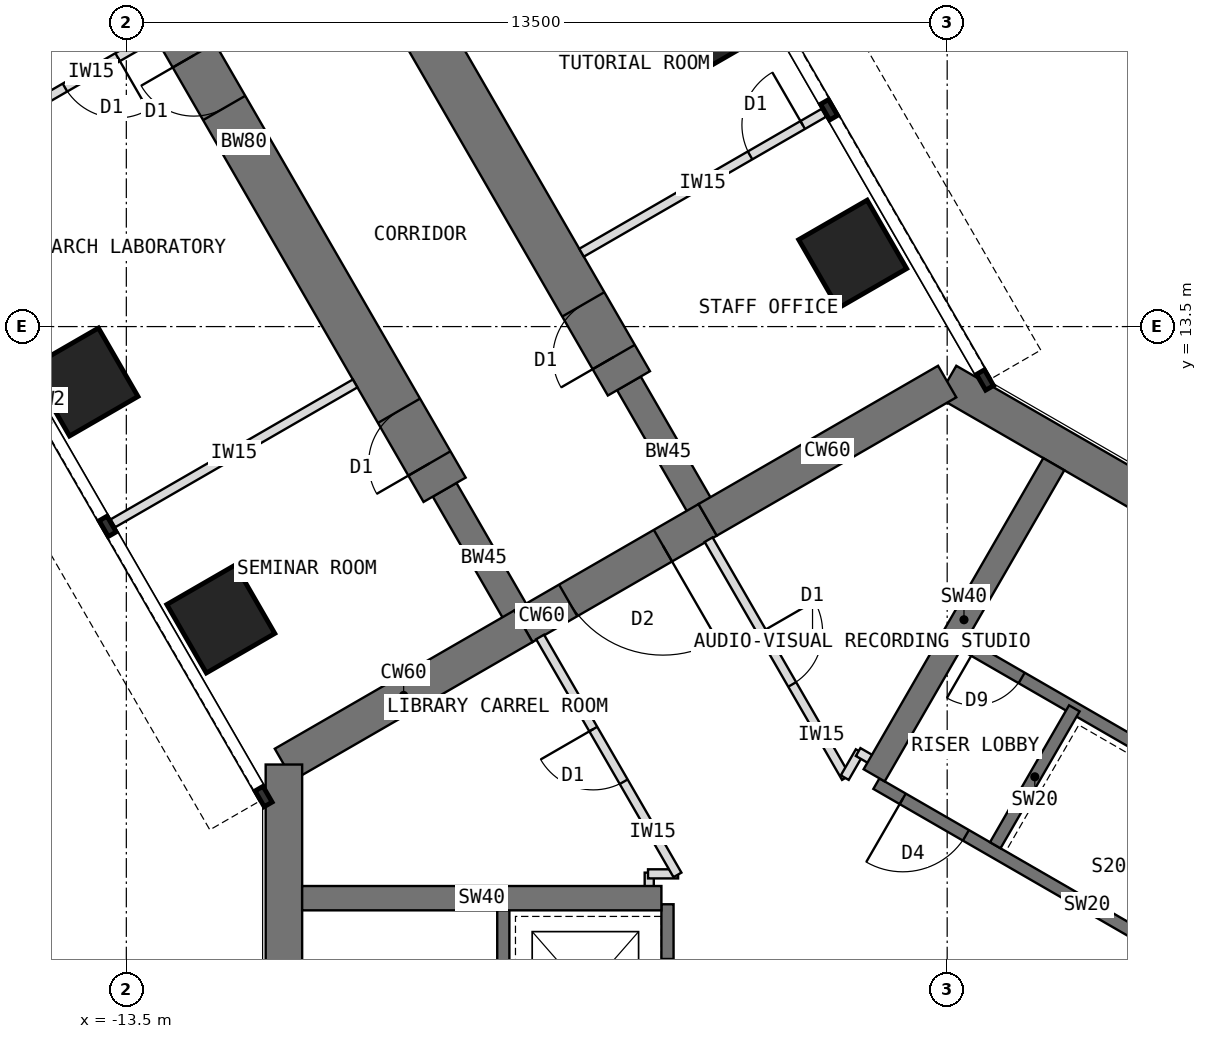
"""IFC4 building model, lengths in metres.
Left out: names, types, materials, properties, quantities, classifications, styles, units other than length and angle.
Written with IfcOpenShell. Run it as: python <this file> out.ifc"""

import sys

from ifc_helpers import new_model, si_unit, direction, frame, frame_2d, origin, origin_2d, place, context, subcontext, project, spatial, rectangle, extrude, element, fill, save


model = new_model("IFC4")
c1 = context("Model", 3, precision=1e-05, world=origin(), true_north=direction((0.0, 1.0)))
c2 = subcontext(c1, "Body", "Model", "MODEL_VIEW")
j1 = project(units=[si_unit("LENGTHUNIT", "METRE"), si_unit("PLANEANGLEUNIT", "RADIAN")], contexts=[c1])
p1 = place(None, origin())
s1 = spatial("IfcSite", under=j1, at=p1, CompositionType="ELEMENT")
p2 = place(p1, origin())
s2 = spatial("IfcBuilding", under=s1, at=p2, CompositionType="ELEMENT")
p3 = place(p2, frame((0.0, 0.0, 125.5)))
s3 = spatial("IfcBuildingStorey", under=s2, at=p3, CompositionType="ELEMENT", Elevation=125.5)
p4 = place(p3, frame((10.908, 6.298, 0.0), z_axis=(0.0, 0.0, 1.0), x_axis=(-0.866021940709, 0.500005998175, 0.0)))
e1 = element("IfcWall", 1, at=p4, inside=s3, PredefinedType="SHEAR", context=c2, shape_type="SweptSolid", body=[
    extrude(rectangle(XDim=12.596, YDim=0.6, at=frame_2d((6.298, 0.0))), origin(), (0.0, 0.0, 1.0), 4.0),
])
p5 = place(p3, frame((0.0, 12.596, 0.0), z_axis=(0.0, 0.0, 1.0), x_axis=(-0.866011268655, -0.500024481964, 0.0)))
e2 = element("IfcWall", 2, at=p5, inside=s3, PredefinedType="SHEAR", context=c2, shape_type="SweptSolid", body=[
    extrude(rectangle(XDim=4.548, YDim=0.6, at=frame_2d((2.274, 0.0))), origin(), (0.0, 0.0, 1.0), 4.0),
])
p6 = place(p3, frame((-3.939, 10.322, 0.0), z_axis=(0.0, 0.0, 1.0), x_axis=(-0.866019471182, -0.500010275428, 0.0)))
e3 = element("IfcWall", 3, at=p6, inside=s3, PredefinedType="SHEAR", context=c2, shape_type="SweptSolid", body=[
    extrude(rectangle(XDim=3.5, YDim=0.6, at=frame_2d((1.75, 0.0))), origin(), (0.0, 0.0, 1.0), 4.0),
])
p7 = place(p6, frame((0.85, 0.0, 0.0)))
e4 = element("IfcOpeningElement", 4, at=p7, cuts=e3, PredefinedType="OPENING", context=c2, shape_type="SweptSolid", body=[
    extrude(rectangle(XDim=1.8, YDim=2.1, at=frame_2d((0.9, 1.05))), frame((0.0, 0.31, 0.0), z_axis=(0.0, -1.0, 0.0), x_axis=(1.0, 0.0, 0.0)), (0.0, 0.0, 1.0), 0.62),
])
p8 = place(p3, frame((-6.97, 8.572, 0.0), z_axis=(0.0, 0.0, 1.0), x_axis=(-0.866034513004, -0.499984222037, 0.0)))
e5 = element("IfcWall", 5, at=p8, inside=s3, PredefinedType="SHEAR", context=c2, shape_type="SweptSolid", body=[
    extrude(rectangle(XDim=4.548, YDim=0.6, at=frame_2d((2.274, 0.0))), origin(), (0.0, 0.0, 1.0), 4.0),
])
p9 = place(p3, frame((-10.908, 6.298, 0.0), z_axis=(0.0, 0.0, 1.0), x_axis=(0.0, -1.0, 0.0)))
e6 = element("IfcWall", 6, at=p9, inside=s3, PredefinedType="SHEAR", context=c2, shape_type="SweptSolid", body=[
    extrude(rectangle(XDim=12.596, YDim=0.6, at=frame_2d((6.298, 0.0))), origin(), (0.0, 0.0, 1.0), 4.0),
])
p10 = place(p3, frame((-6.97, 8.572, 0.0), z_axis=(0.0, 0.0, 1.0), x_axis=(-0.499988811324, 0.866031863473, 0.0)))
e7 = element("IfcWall", 7, at=p10, inside=s3, PredefinedType="SHEAR", context=c2, shape_type="SweptSolid", body=[
    extrude(rectangle(XDim=2.592, YDim=0.45, at=frame_2d((1.296, 0.0))), origin(), (0.0, 0.0, 1.0), 4.0),
])
p11 = place(p3, frame((-8.266, 10.816, 0.0), z_axis=(0.0, 0.0, 1.0), x_axis=(-0.499996231654, 0.866027579429, 0.0)))
e8 = element("IfcWall", 8, at=p11, inside=s3, PredefinedType="SHEAR", context=c2, shape_type="SweptSolid", body=[
    extrude(rectangle(XDim=13.2, YDim=0.8, at=frame_2d((6.6, 0.0))), origin(), (0.0, 0.0, 1.0), 4.0),
])
p12 = place(p11, frame((0.5, 0.0, 0.0)))
e9 = element("IfcOpeningElement", 9, at=p12, cuts=e8, PredefinedType="OPENING", context=c2, shape_type="SweptSolid", body=[
    extrude(rectangle(XDim=1.0, YDim=2.1, at=frame_2d((0.5, 1.05))), frame((0.0, 0.41, 0.0), z_axis=(0.0, -1.0, 0.0), x_axis=(1.0, 0.0, 0.0)), (0.0, 0.0, 1.0), 0.82),
])
p13 = place(p11, frame((7.25, 0.0, 0.0)))
e10 = element("IfcOpeningElement", 10, at=p13, cuts=e8, PredefinedType="OPENING", context=c2, shape_type="SweptSolid", body=[
    extrude(rectangle(XDim=1.0, YDim=2.1, at=frame_2d((0.5, 1.05))), frame((0.0, 0.41, 0.0), z_axis=(0.0, -1.0, 0.0), x_axis=(1.0, 0.0, 0.0)), (0.0, 0.0, 1.0), 0.82),
])
p14 = place(p3, frame((-3.939, 10.322, 0.0), z_axis=(0.0, 0.0, 1.0), x_axis=(-0.499918158782, 0.866072649678, 0.0)))
e11 = element("IfcWall", 11, at=p14, inside=s3, PredefinedType="SHEAR", context=c2, shape_type="SweptSolid", body=[
    extrude(rectangle(XDim=2.592, YDim=0.45, at=frame_2d((1.296, 0.0))), origin(), (0.0, 0.0, 1.0), 4.0),
])
p15 = place(p3, frame((-5.234, 12.566, 0.0), z_axis=(0.0, 0.0, 1.0), x_axis=(-0.500010103361, 0.866019570528, 0.0)))
e12 = element("IfcWall", 12, at=p15, inside=s3, PredefinedType="SHEAR", context=c2, shape_type="SweptSolid", body=[
    extrude(rectangle(XDim=13.2, YDim=0.8, at=frame_2d((6.6, 0.0))), origin(), (0.0, 0.0, 1.0), 4.0),
])
p16 = place(p15, frame((0.5, 0.0, 0.0)))
e13 = element("IfcOpeningElement", 13, at=p16, cuts=e12, PredefinedType="OPENING", context=c2, shape_type="SweptSolid", body=[
    extrude(rectangle(XDim=1.0, YDim=2.1, at=frame_2d((0.5, 1.05))), frame((0.0, 0.41, 0.0), z_axis=(0.0, -1.0, 0.0), x_axis=(1.0, 0.0, 0.0)), (0.0, 0.0, 1.0), 0.82),
])
p17 = place(p15, frame((7.25, 0.0, 0.0)))
e14 = element("IfcOpeningElement", 14, at=p17, cuts=e12, PredefinedType="OPENING", context=c2, shape_type="SweptSolid", body=[
    extrude(rectangle(XDim=1.0, YDim=2.1, at=frame_2d((0.5, 1.05))), frame((0.0, 0.41, 0.0), z_axis=(0.0, -1.0, 0.0), x_axis=(1.0, 0.0, 0.0)), (0.0, 0.0, 1.0), 0.82),
])
for number, where, z_axis, x_axis in (
    (15, (-11.946, 8.691, 0.0), (0.0, 0.0, 1.0), (0.866, 0.5, 0.0)),
    (16, (-1.554, 14.691, 0.0), (0.0, 0.0, 1.0), (0.866, 0.5, 0.0)),
    (17, (-14.196, 12.588, 0.0), (0.0, 0.0, 1.0), (0.866, 0.5, 0.0)),
    (18, (-3.804, 18.588, 0.0), (0.0, 0.0, 1.0), (0.866, 0.5, 0.0)),
):
    element("IfcColumn", number, at=place(p3, frame(where, z_axis=z_axis, x_axis=x_axis)), inside=s3, PredefinedType="COLUMN", context=c2, shape_type="SweptSolid", body=[
        extrude(rectangle(XDim=1.3, YDim=1.3, at=origin_2d()), origin(), (0.0, 0.0, 1.0), 4.0),
    ])
p18 = place(p3, frame((5.764, 1.984, 0.0), z_axis=(0.0, 0.0, 1.0), x_axis=(-0.866026010844, 0.49999894854, 0.0)))
e19 = element("IfcWall", 19, at=p18, inside=s3, PredefinedType="SHEAR", context=c2, shape_type="SweptSolid", body=[
    extrude(rectangle(XDim=8.0, YDim=0.2, at=frame_2d((4.0, 0.0))), origin(), (0.0, 0.0, 1.0), 4.0),
])
p19 = place(p18, frame((6.3, 0.0, 0.0)))
e20 = element("IfcOpeningElement", 20, at=p19, cuts=e19, PredefinedType="OPENING", context=c2, shape_type="SweptSolid", body=[
    extrude(rectangle(XDim=1.2, YDim=2.1, at=frame_2d((0.6, 1.05))), frame((0.0, 0.11, 0.0), z_axis=(0.0, -1.0, 0.0), x_axis=(1.0, 0.0, 0.0)), (0.0, 0.0, 1.0), 0.22),
])
p20 = place(p3, frame((0.791, 4.97, 0.0), z_axis=(0.0, 0.0, 1.0), x_axis=(0.499936506574, 0.866062058628, 0.0)))
e21 = element("IfcWall", 21, at=p20, inside=s3, PredefinedType="SHEAR", context=c2, shape_type="SweptSolid", body=[
    extrude(rectangle(XDim=2.6, YDim=0.2, at=frame_2d((1.3, 0.0))), origin(), (0.0, 0.0, 1.0), 4.0),
])
p21 = place(p3, frame((7.114, 4.322, 0.0), z_axis=(0.0, 0.0, 1.0), x_axis=(-0.866026010844, 0.49999894854, 0.0)))
e22 = element("IfcWall", 22, at=p21, inside=s3, PredefinedType="SHEAR", context=c2, shape_type="SweptSolid", body=[
    extrude(rectangle(XDim=8.0, YDim=0.2, at=frame_2d((4.0, 0.0))), origin(), (0.0, 0.0, 1.0), 4.0),
])
p22 = place(p21, frame((6.8, 0.0, 0.0)))
e23 = element("IfcOpeningElement", 23, at=p22, cuts=e22, PredefinedType="OPENING", context=c2, shape_type="SweptSolid", body=[
    extrude(rectangle(XDim=0.9, YDim=2.1, at=frame_2d((0.45, 1.05))), frame((0.0, 0.11, 0.0), z_axis=(0.0, -1.0, 0.0), x_axis=(1.0, 0.0, 0.0)), (0.0, 0.0, 1.0), 0.22),
])
p23 = place(p3, frame((-1.201, 6.12, 0.0), z_axis=(0.0, 0.0, 1.0), x_axis=(0.49999668571, 0.866027317282, 0.0)))
e24 = element("IfcWall", 24, at=p23, inside=s3, PredefinedType="SHEAR", context=c2, shape_type="SweptSolid", body=[
    extrude(rectangle(XDim=5.908, YDim=0.4, at=frame_2d((2.954, 0.0))), origin(), (0.0, 0.0, 1.0), 4.0),
])
p24 = place(p3, frame((-4.6, 4.0, 0.0), z_axis=(0.0, 0.0, 1.0), x_axis=(0.0, -1.0, 0.0)))
e25 = element("IfcWall", 25, at=p24, inside=s3, PredefinedType="SHEAR", context=c2, shape_type="SweptSolid", body=[
    extrude(rectangle(XDim=8.0, YDim=0.2, at=frame_2d((4.0, 0.0))), origin(), (0.0, 0.0, 1.0), 4.0),
])
p25 = place(p24, frame((6.3, 0.0, 0.0)))
e26 = element("IfcOpeningElement", 26, at=p25, cuts=e25, PredefinedType="OPENING", context=c2, shape_type="SweptSolid", body=[
    extrude(rectangle(XDim=1.2, YDim=2.1, at=frame_2d((0.6, 1.05))), frame((0.0, 0.11, 0.0), z_axis=(0.0, -1.0, 0.0), x_axis=(1.0, 0.0, 0.0)), (0.0, 0.0, 1.0), 0.22),
])
p26 = place(p24, frame((0.9, 0.0, 0.0)))
e27 = element("IfcOpeningElement", 27, at=p26, cuts=e25, PredefinedType="OPENING", context=c2, shape_type="SweptSolid", body=[
    extrude(rectangle(XDim=1.1, YDim=2.2, at=frame_2d((0.55, 1.1))), frame((0.0, 0.11, 0.0), z_axis=(0.0, -1.0, 0.0), x_axis=(1.0, 0.0, 0.0)), (0.0, 0.0, 1.0), 0.22),
])
p27 = place(p3, frame((-7.3, 4.0, 0.0), z_axis=(0.0, 0.0, 1.0), x_axis=(0.0, -1.0, 0.0)))
e28 = element("IfcWall", 28, at=p27, inside=s3, PredefinedType="SHEAR", context=c2, shape_type="SweptSolid", body=[
    extrude(rectangle(XDim=8.0, YDim=0.2, at=frame_2d((4.0, 0.0))), origin(), (0.0, 0.0, 1.0), 4.0),
])
p28 = place(p27, frame((6.7, 0.0, 0.0)))
e29 = element("IfcOpeningElement", 29, at=p28, cuts=e28, PredefinedType="OPENING", context=c2, shape_type="SweptSolid", body=[
    extrude(rectangle(XDim=1.1, YDim=2.1, at=frame_2d((0.55, 1.05))), frame((0.0, 0.11, 0.0), z_axis=(0.0, -1.0, 0.0), x_axis=(1.0, 0.0, 0.0)), (0.0, 0.0, 1.0), 0.22),
])
p29 = place(p3, frame((-4.7, 4.1, 0.0), z_axis=(0.0, 0.0, 1.0), x_axis=(-1.0, 0.0, 0.0)))
e30 = element("IfcWall", 30, at=p29, inside=s3, PredefinedType="SHEAR", context=c2, shape_type="SweptSolid", body=[
    extrude(rectangle(XDim=5.908, YDim=0.4, at=frame_2d((2.954, 0.0))), origin(), (0.0, 0.0, 1.0), 4.0),
])
p30 = place(p3, frame((-9.737, 12.565, 0.0), z_axis=(0.0, 0.0, 1.0), x_axis=(-0.866016770315, -0.500014953309, 0.0)))
e31 = element("IfcWall", 31, at=p30, inside=s3, PredefinedType="PARTITIONING", context=c2, shape_type="SweptSolid", body=[
    extrude(rectangle(XDim=4.6, YDim=0.15, at=frame_2d((2.3, 0.0))), origin(), (0.0, 0.0, 1.0), 3.8),
])
p31 = place(p3, frame((-13.037, 18.281, 0.0), z_axis=(0.0, 0.0, 1.0), x_axis=(-0.866006032174, -0.500033551112, 0.0)))
e32 = element("IfcWall", 32, at=p31, inside=s3, PredefinedType="PARTITIONING", context=c2, shape_type="SweptSolid", body=[
    extrude(rectangle(XDim=2.4, YDim=0.15, at=frame_2d((1.2, 0.0))), origin(), (0.0, 0.0, 1.0), 3.8),
])
p32 = place(p31, frame((0.7, 0.0, 0.0)))
e33 = element("IfcOpeningElement", 33, at=p32, cuts=e32, PredefinedType="OPENING", context=c2, shape_type="SweptSolid", body=[
    extrude(rectangle(XDim=1.0, YDim=2.1, at=frame_2d((0.5, 1.05))), frame((0.0, 0.085, 0.0), z_axis=(0.0, -1.0, 0.0), x_axis=(1.0, 0.0, 0.0)), (0.0, 0.0, 1.0), 0.17),
])
p33 = place(p3, frame((-6.013, 14.715, 0.0), z_axis=(0.0, 0.0, 1.0), x_axis=(0.866016770315, 0.500014953309, 0.0)))
e34 = element("IfcWall", 34, at=p33, inside=s3, PredefinedType="PARTITIONING", context=c2, shape_type="SweptSolid", body=[
    extrude(rectangle(XDim=4.6, YDim=0.15, at=frame_2d((2.3, 0.0))), origin(), (0.0, 0.0, 1.0), 3.8),
])
p34 = place(p33, frame((3.2, 0.0, 0.0)))
e35 = element("IfcOpeningElement", 35, at=p34, cuts=e34, PredefinedType="OPENING", context=c2, shape_type="SweptSolid", body=[
    extrude(rectangle(XDim=1.0, YDim=2.1, at=frame_2d((0.5, 1.05))), frame((0.0, 0.085, 0.0), z_axis=(0.0, -1.0, 0.0), x_axis=(1.0, 0.0, 0.0)), (0.0, 0.0, 1.0), 0.17),
])
p35 = place(p3, frame((-4.9, 4.09, 0.0), z_axis=(0.0, 0.0, 1.0), x_axis=(0.0, 1.0, 0.0)))
e36 = element("IfcWall", 36, at=p35, inside=s3, PredefinedType="PARTITIONING", context=c2, shape_type="SweptSolid", body=[
    extrude(rectangle(XDim=0.43, YDim=0.15, at=frame_2d((0.215, 0.0))), origin(), (0.0, 0.0, 1.0), 3.8),
])
p36 = place(p3, frame((-4.92, 4.5, 0.0), z_axis=(0.0, 0.0, 1.0), x_axis=(1.0, 0.0, 0.0)))
e37 = element("IfcWall", 37, at=p36, inside=s3, PredefinedType="PARTITIONING", context=c2, shape_type="SweptSolid", body=[
    extrude(rectangle(XDim=0.494, YDim=0.15, at=frame_2d((0.247, 0.0))), origin(), (0.0, 0.0, 1.0), 3.8),
])
p37 = place(p3, frame((-4.436, 4.483, 0.0), z_axis=(0.0, 0.0, 1.0), x_axis=(-0.500009315796, 0.86602002524, 0.0)))
e38 = element("IfcWall", 38, at=p37, inside=s3, PredefinedType="PARTITIONING", context=c2, shape_type="SweptSolid", body=[
    extrude(rectangle(XDim=4.519, YDim=0.15, at=frame_2d((2.259, 0.0))), origin(), (0.0, 0.0, 1.0), 3.8),
])
p38 = place(p37, frame((1.769, 0.0, 0.0)))
e39 = element("IfcOpeningElement", 39, at=p38, cuts=e38, PredefinedType="OPENING", context=c2, shape_type="SweptSolid", body=[
    extrude(rectangle(XDim=1.0, YDim=2.1, at=frame_2d((0.5, 1.05))), frame((0.0, 0.085, 0.0), z_axis=(0.0, -1.0, 0.0), x_axis=(1.0, 0.0, 0.0)), (0.0, 0.0, 1.0), 0.17),
])
p39 = place(p3, frame((-3.924, 9.996, 0.0), z_axis=(0.0, 0.0, 1.0), x_axis=(0.500032713409, -0.866006515865, 0.0)))
e40 = element("IfcWall", 40, at=p39, inside=s3, PredefinedType="PARTITIONING", context=c2, shape_type="SweptSolid", body=[
    extrude(rectangle(XDim=4.518, YDim=0.15, at=frame_2d((2.259, 0.0))), origin(), (0.0, 0.0, 1.0), 3.8),
])
p40 = place(p39, frame((1.749, 0.0, 0.0)))
e41 = element("IfcOpeningElement", 41, at=p40, cuts=e40, PredefinedType="OPENING", context=c2, shape_type="SweptSolid", body=[
    extrude(rectangle(XDim=1.0, YDim=2.1, at=frame_2d((0.5, 1.05))), frame((0.0, 0.085, 0.0), z_axis=(0.0, -1.0, 0.0), x_axis=(1.0, 0.0, 0.0)), (0.0, 0.0, 1.0), 0.17),
])
p41 = place(p3, frame((-1.684, 6.083, 0.0), z_axis=(0.0, 0.0, 1.0), x_axis=(0.50033519877, 0.865831790172, 0.0)))
e42 = element("IfcWall", 42, at=p41, inside=s3, PredefinedType="PARTITIONING", context=c2, shape_type="SweptSolid", body=[
    extrude(rectangle(XDim=0.494, YDim=0.15, at=frame_2d((0.247, 0.0))), origin(), (0.0, 0.0, 1.0), 3.8),
])
p42 = place(p3, frame((-1.464, 6.503, 0.0), z_axis=(0.0, 0.0, 1.0), x_axis=(0.866138304741, -0.499804398801, 0.0)))
e43 = element("IfcWall", 43, at=p42, inside=s3, PredefinedType="PARTITIONING", context=c2, shape_type="SweptSolid", body=[
    extrude(rectangle(XDim=0.43, YDim=0.15, at=frame_2d((0.215, 0.0))), origin(), (0.0, 0.0, 1.0), 3.8),
])
p43 = place(p19, origin())
e44 = element("IfcDoor", 44, at=p43, inside=s3, OperationType="SINGLE_SWING_RIGHT", PredefinedType="DOOR", context=c2, shape_type="SweptSolid", body=[
    extrude(rectangle(XDim=1.2, YDim=2.1, at=frame_2d((0.6, 1.05))), frame((0.0, 0.025, 0.0), z_axis=(0.0, -1.0, 0.0), x_axis=(1.0, 0.0, 0.0)), (0.0, 0.0, 1.0), 0.05),
])
fill(e20, e44)
p44 = place(p22, origin())
e45 = element("IfcDoor", 45, at=p44, inside=s3, OperationType="SINGLE_SWING_RIGHT", PredefinedType="DOOR", context=c2, shape_type="SweptSolid", body=[
    extrude(rectangle(XDim=0.9, YDim=2.1, at=frame_2d((0.45, 1.05))), frame((0.0, 0.025, 0.0), z_axis=(0.0, -1.0, 0.0), x_axis=(1.0, 0.0, 0.0)), (0.0, 0.0, 1.0), 0.05),
])
fill(e23, e45)
p45 = place(p7, origin())
e46 = element("IfcDoor", 46, at=p45, inside=s3, OperationType="DOUBLE_DOOR_DOUBLE_SWING", PredefinedType="DOOR", context=c2, shape_type="SweptSolid", body=[
    extrude(rectangle(XDim=1.72, YDim=2.06, at=frame_2d((0.9, 1.03))), frame((0.0, 0.025, 0.0), z_axis=(0.0, -1.0, 0.0), x_axis=(1.0, 0.0, 0.0)), (0.0, 0.0, 1.0), 0.05),
    extrude(rectangle(XDim=0.04, YDim=2.1, at=frame_2d((0.02, 1.05))), frame((0.0, 0.3, 0.0), z_axis=(0.0, -1.0, 0.0), x_axis=(1.0, 0.0, 0.0)), (0.0, 0.0, 1.0), 0.6),
    extrude(rectangle(XDim=0.04, YDim=2.1, at=frame_2d((1.78, 1.05))), frame((0.0, 0.3, 0.0), z_axis=(0.0, -1.0, 0.0), x_axis=(1.0, 0.0, 0.0)), (0.0, 0.0, 1.0), 0.6),
    extrude(rectangle(XDim=1.72, YDim=0.04, at=frame_2d((0.9, 2.08))), frame((0.0, 0.3, 0.0), z_axis=(0.0, -1.0, 0.0), x_axis=(1.0, 0.0, 0.0)), (0.0, 0.0, 1.0), 0.6),
])
fill(e4, e46)
p46 = place(p32, origin())
e47 = element("IfcDoor", 47, at=p46, inside=s3, OperationType="SINGLE_SWING_LEFT", PredefinedType="DOOR", context=c2, shape_type="SweptSolid", body=[
    extrude(rectangle(XDim=1.0, YDim=2.1, at=frame_2d((0.5, 1.05))), frame((0.0, 0.025, 0.0), z_axis=(0.0, -1.0, 0.0), x_axis=(1.0, 0.0, 0.0)), (0.0, 0.0, 1.0), 0.05),
])
fill(e33, e47)
p47 = place(p34, origin())
e48 = element("IfcDoor", 48, at=p47, inside=s3, OperationType="SINGLE_SWING_RIGHT", PredefinedType="DOOR", context=c2, shape_type="SweptSolid", body=[
    extrude(rectangle(XDim=1.0, YDim=2.1, at=frame_2d((0.5, 1.05))), frame((0.0, 0.025, 0.0), z_axis=(0.0, -1.0, 0.0), x_axis=(1.0, 0.0, 0.0)), (0.0, 0.0, 1.0), 0.05),
])
fill(e35, e48)
p48 = place(p40, origin())
e49 = element("IfcDoor", 49, at=p48, inside=s3, OperationType="SINGLE_SWING_LEFT", PredefinedType="DOOR", context=c2, shape_type="SweptSolid", body=[
    extrude(rectangle(XDim=1.0, YDim=2.1, at=frame_2d((0.5, 1.05))), frame((0.0, 0.025, 0.0), z_axis=(0.0, -1.0, 0.0), x_axis=(1.0, 0.0, 0.0)), (0.0, 0.0, 1.0), 0.05),
])
fill(e41, e49)
p49 = place(p38, origin())
e50 = element("IfcDoor", 50, at=p49, inside=s3, OperationType="SINGLE_SWING_RIGHT", PredefinedType="DOOR", context=c2, shape_type="SweptSolid", body=[
    extrude(rectangle(XDim=1.0, YDim=2.1, at=frame_2d((0.5, 1.05))), frame((0.0, 0.025, 0.0), z_axis=(0.0, -1.0, 0.0), x_axis=(1.0, 0.0, 0.0)), (0.0, 0.0, 1.0), 0.05),
])
fill(e39, e50)
p50 = place(p12, origin())
e51 = element("IfcDoor", 51, at=p50, inside=s3, OperationType="SINGLE_SWING_LEFT", PredefinedType="DOOR", context=c2, shape_type="SweptSolid", body=[
    extrude(rectangle(XDim=0.92, YDim=2.06, at=frame_2d((0.5, 1.03))), frame((0.0, 0.025, 0.0), z_axis=(0.0, -1.0, 0.0), x_axis=(1.0, 0.0, 0.0)), (0.0, 0.0, 1.0), 0.05),
    extrude(rectangle(XDim=0.04, YDim=2.1, at=frame_2d((0.02, 1.05))), frame((0.0, 0.4, 0.0), z_axis=(0.0, -1.0, 0.0), x_axis=(1.0, 0.0, 0.0)), (0.0, 0.0, 1.0), 0.8),
    extrude(rectangle(XDim=0.04, YDim=2.1, at=frame_2d((0.98, 1.05))), frame((0.0, 0.4, 0.0), z_axis=(0.0, -1.0, 0.0), x_axis=(1.0, 0.0, 0.0)), (0.0, 0.0, 1.0), 0.8),
    extrude(rectangle(XDim=0.92, YDim=0.04, at=frame_2d((0.5, 2.08))), frame((0.0, 0.4, 0.0), z_axis=(0.0, -1.0, 0.0), x_axis=(1.0, 0.0, 0.0)), (0.0, 0.0, 1.0), 0.8),
])
fill(e9, e51)
p51 = place(p13, origin())
e52 = element("IfcDoor", 52, at=p51, inside=s3, OperationType="SINGLE_SWING_RIGHT", PredefinedType="DOOR", context=c2, shape_type="SweptSolid", body=[
    extrude(rectangle(XDim=0.92, YDim=2.06, at=frame_2d((0.5, 1.03))), frame((0.0, 0.025, 0.0), z_axis=(0.0, -1.0, 0.0), x_axis=(1.0, 0.0, 0.0)), (0.0, 0.0, 1.0), 0.05),
    extrude(rectangle(XDim=0.04, YDim=2.1, at=frame_2d((0.02, 1.05))), frame((0.0, 0.4, 0.0), z_axis=(0.0, -1.0, 0.0), x_axis=(1.0, 0.0, 0.0)), (0.0, 0.0, 1.0), 0.8),
    extrude(rectangle(XDim=0.04, YDim=2.1, at=frame_2d((0.98, 1.05))), frame((0.0, 0.4, 0.0), z_axis=(0.0, -1.0, 0.0), x_axis=(1.0, 0.0, 0.0)), (0.0, 0.0, 1.0), 0.8),
    extrude(rectangle(XDim=0.92, YDim=0.04, at=frame_2d((0.5, 2.08))), frame((0.0, 0.4, 0.0), z_axis=(0.0, -1.0, 0.0), x_axis=(1.0, 0.0, 0.0)), (0.0, 0.0, 1.0), 0.8),
])
fill(e10, e52)
p52 = place(p16, origin())
e53 = element("IfcDoor", 53, at=p52, inside=s3, OperationType="SINGLE_SWING_LEFT", PredefinedType="DOOR", context=c2, shape_type="SweptSolid", body=[
    extrude(rectangle(XDim=0.92, YDim=2.06, at=frame_2d((0.5, 1.03))), frame((0.0, 0.025, 0.0), z_axis=(0.0, -1.0, 0.0), x_axis=(1.0, 0.0, 0.0)), (0.0, 0.0, 1.0), 0.05),
    extrude(rectangle(XDim=0.04, YDim=2.1, at=frame_2d((0.02, 1.05))), frame((0.0, 0.4, 0.0), z_axis=(0.0, -1.0, 0.0), x_axis=(1.0, 0.0, 0.0)), (0.0, 0.0, 1.0), 0.8),
    extrude(rectangle(XDim=0.04, YDim=2.1, at=frame_2d((0.98, 1.05))), frame((0.0, 0.4, 0.0), z_axis=(0.0, -1.0, 0.0), x_axis=(1.0, 0.0, 0.0)), (0.0, 0.0, 1.0), 0.8),
    extrude(rectangle(XDim=0.92, YDim=0.04, at=frame_2d((0.5, 2.08))), frame((0.0, 0.4, 0.0), z_axis=(0.0, -1.0, 0.0), x_axis=(1.0, 0.0, 0.0)), (0.0, 0.0, 1.0), 0.8),
])
fill(e13, e53)
save(model, sys.argv[1])
